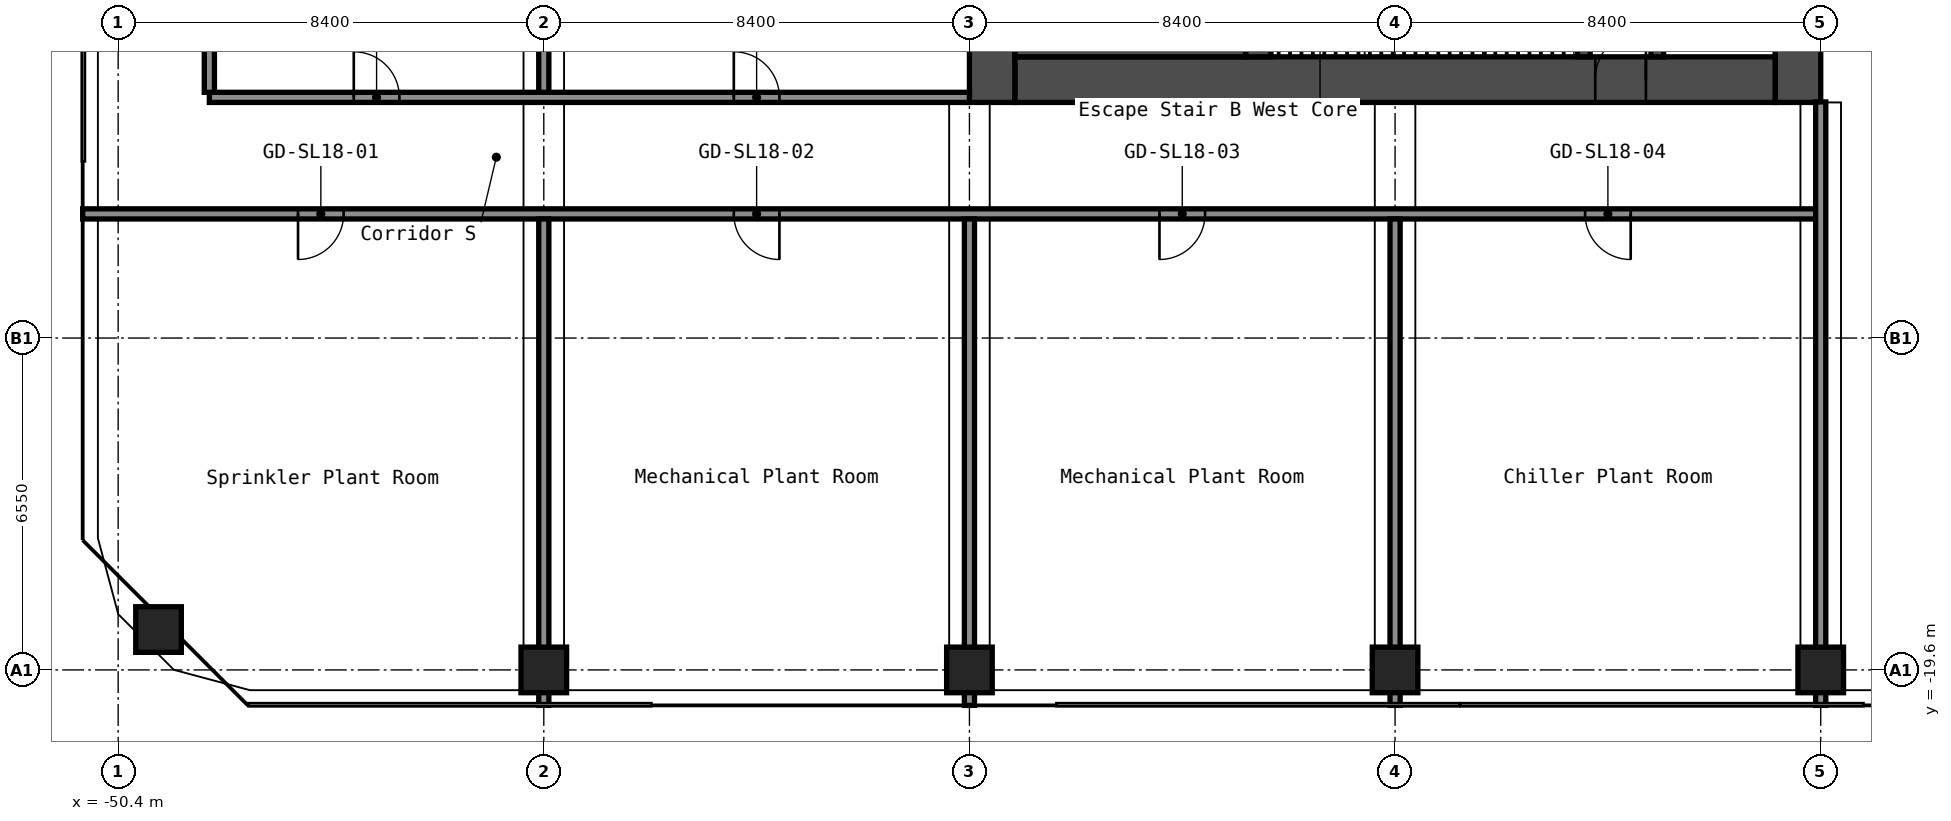
"""IFC4 building model, lengths in metres.
Left out: names, types, materials, properties, quantities, classifications, styles, units other than length and angle.
Written with IfcOpenShell. Run it as: python <this file> out.ifc"""

import sys

from ifc_helpers import new_model, si_unit, direction, frame, frame_2d, origin, origin_2d, place, context, subcontext, project, spatial, rectangle, hollow_rectangle, extrude, element, fill, save


model = new_model("IFC4")
c1 = context("Model", 3, precision=1e-05, world=origin(), true_north=direction((0.0, 1.0)))
c2 = subcontext(c1, "Body", "Model", "MODEL_VIEW")
j1 = project(units=[si_unit("LENGTHUNIT", "METRE"), si_unit("PLANEANGLEUNIT", "RADIAN")], contexts=[c1])
p1 = place(None, origin())
s1 = spatial("IfcSite", under=j1, at=p1, CompositionType="ELEMENT")
p2 = place(p1, origin())
s2 = spatial("IfcBuilding", under=s1, at=p2, CompositionType="ELEMENT")
p3 = place(p2, frame((0.0, 0.0, 64.6)))
s3 = spatial("IfcBuildingStorey", under=s2, at=p3, CompositionType="ELEMENT", Elevation=64.6)
for number, where, z_axis, x_axis in (
    (1, (-49.603, -18.803, 0.0), (0.0, 0.0, 1.0), (1.0, 0.0, 0.0)),
    (2, (-42.0, -19.6, 0.0), (0.0, 0.0, 1.0), (1.0, 0.0, 0.0)),
    (3, (-33.6, -19.6, 0.0), (0.0, 0.0, 1.0), (1.0, 0.0, 0.0)),
    (4, (-25.2, -19.6, 0.0), (0.0, 0.0, 1.0), (1.0, 0.0, 0.0)),
    (5, (-16.8, -19.6, 0.0), (0.0, 0.0, 1.0), (1.0, 0.0, 0.0)),
):
    element("IfcColumn", number, at=place(p3, frame(where, z_axis=z_axis, x_axis=x_axis)), inside=s3, PredefinedType="COLUMN", context=c2, shape_type="SweptSolid", body=[
        extrude(hollow_rectangle(XDim=0.9, YDim=0.9, WallThickness=0.036, at=origin_2d()), origin(), (0.0, 0.0, 1.0), 4.1),
    ])
p4 = place(p3, frame((-17.25, -8.4, 0.0), z_axis=(0.0, 0.0, 1.0), x_axis=(0.0, 1.0, 0.0)))
e6 = element("IfcWall", 6, at=p4, inside=s3, PredefinedType="SHEAR", context=c2, shape_type="SweptSolid", body=[
    extrude(rectangle(XDim=16.8, YDim=0.9, at=frame_2d((8.4, 0.0))), origin(), (0.0, 0.0, 1.0), 4.1),
])
p5 = place(p4, frame((7.6, 0.0, 0.0)))
e7 = element("IfcOpeningElement", 7, at=p5, cuts=e6, PredefinedType="OPENING", context=c2, shape_type="SweptSolid", body=[
    extrude(rectangle(XDim=1.2, YDim=2.1, at=frame_2d((0.6, 1.05))), frame((0.0, 0.46, 0.0), z_axis=(0.0, -1.0, 0.0), x_axis=(1.0, 0.0, 0.0)), (0.0, 0.0, 1.0), 0.92),
])
p6 = place(p3, frame((-33.15, -8.4, 0.0), z_axis=(0.0, 0.0, 1.0), x_axis=(0.0, 1.0, 0.0)))
e8 = element("IfcWall", 8, at=p6, inside=s3, PredefinedType="SHEAR", context=c2, shape_type="SweptSolid", body=[
    extrude(rectangle(XDim=16.8, YDim=0.9, at=frame_2d((8.4, 0.0))), origin(), (0.0, 0.0, 1.0), 4.1),
])
p7 = place(p3, frame((-32.7, -7.95, 0.0), z_axis=(0.0, 0.0, 1.0), x_axis=(1.0, 0.0, 0.0)))
e9 = element("IfcWall", 9, at=p7, inside=s3, PredefinedType="SHEAR", context=c2, shape_type="SweptSolid", body=[
    extrude(rectangle(XDim=15.0, YDim=0.9, at=frame_2d((7.5, 0.0))), origin(), (0.0, 0.0, 1.0), 4.1),
])
p8 = place(p7, frame((11.45, 0.0, 0.0)))
e10 = element("IfcOpeningElement", 10, at=p8, cuts=e9, PredefinedType="OPENING", context=c2, shape_type="SweptSolid", body=[
    extrude(rectangle(XDim=1.0, YDim=2.1, at=frame_2d((0.5, 1.05))), frame((0.0, 0.46, 0.0), z_axis=(0.0, -1.0, 0.0), x_axis=(1.0, 0.0, 0.0)), (0.0, 0.0, 1.0), 0.92),
])
p9 = place(p3, frame((-20.025, -7.5, 0.0), z_axis=(0.0, 0.0, 1.0), x_axis=(0.0, 1.0, 0.0)))
e11 = element("IfcWall", 11, at=p9, inside=s3, PredefinedType="SHEAR", context=c2, shape_type="SweptSolid", body=[
    extrude(rectangle(XDim=6.3, YDim=0.25, at=frame_2d((3.15, 0.0))), origin(), (0.0, 0.0, 1.0), 4.1),
])
p10 = place(p9, frame((2.4, 0.0, 0.0)))
e12 = element("IfcOpeningElement", 12, at=p10, cuts=e11, PredefinedType="OPENING", context=c2, shape_type="SweptSolid", body=[
    extrude(rectangle(XDim=1.0, YDim=2.1, at=frame_2d((0.5, 1.05))), frame((0.0, 0.135, 0.0), z_axis=(0.0, -1.0, 0.0), x_axis=(1.0, 0.0, 0.0)), (0.0, 0.0, 1.0), 0.27),
])
p11 = place(p3, frame((-21.475, -7.5, 0.0), z_axis=(0.0, 0.0, 1.0), x_axis=(0.0, 1.0, 0.0)))
e13 = element("IfcWall", 13, at=p11, inside=s3, PredefinedType="SHEAR", context=c2, shape_type="SweptSolid", body=[
    extrude(rectangle(XDim=3.75, YDim=0.25, at=frame_2d((1.875, 0.0))), origin(), (0.0, 0.0, 1.0), 4.1),
])
p12 = place(p11, frame((1.3, 0.0, 0.0)))
e14 = element("IfcOpeningElement", 14, at=p12, cuts=e13, PredefinedType="OPENING", context=c2, shape_type="SweptSolid", body=[
    extrude(rectangle(XDim=1.2, YDim=2.1, at=frame_2d((0.6, 1.05))), frame((0.0, 0.135, 0.0), z_axis=(0.0, -1.0, 0.0), x_axis=(1.0, 0.0, 0.0)), (0.0, 0.0, 1.0), 0.27),
])
p13 = place(p3, frame((-27.9, -7.5, 0.0), z_axis=(0.0, 0.0, 1.0), x_axis=(0.0, 1.0, 0.0)))
e15 = element("IfcWall", 15, at=p13, inside=s3, PredefinedType="SHEAR", context=c2, shape_type="SweptSolid", body=[
    extrude(rectangle(XDim=3.75, YDim=0.5, at=frame_2d((1.875, 0.0))), origin(), (0.0, 0.0, 1.0), 4.1),
])
p14 = place(p3, frame((-32.7, -6.75, 0.0), z_axis=(0.0, 0.0, 1.0), x_axis=(1.0, 0.0, 0.0)))
e16 = element("IfcWall", 16, at=p14, inside=s3, PredefinedType="SHEAR", context=c2, shape_type="SweptSolid", body=[
    extrude(rectangle(XDim=4.55, YDim=1.5, at=frame_2d((2.275, 0.0))), origin(), (0.0, 0.0, 1.0), 4.1),
])
p15 = place(p3, frame((-51.1, -10.6, 0.0), z_axis=(0.0, 0.0, 1.0), x_axis=(1.0, 0.0, 0.0)))
e17 = element("IfcWall", 17, at=p15, inside=s3, PredefinedType="PARTITIONING", context=c2, shape_type="SweptSolid", body=[
    extrude(rectangle(XDim=34.3, YDim=0.2, at=frame_2d((17.15, 0.0))), origin(), (0.0, 0.0, 1.0), 4.1),
])
p16 = place(p15, frame((4.25, 0.0, 0.0)))
e18 = element("IfcOpeningElement", 18, at=p16, cuts=e17, PredefinedType="OPENING", context=c2, shape_type="SweptSolid", body=[
    extrude(rectangle(XDim=0.9, YDim=2.1, at=frame_2d((0.45, 1.05))), frame((0.0, 0.11, 0.0), z_axis=(0.0, -1.0, 0.0), x_axis=(1.0, 0.0, 0.0)), (0.0, 0.0, 1.0), 0.22),
])
p17 = place(p15, frame((12.85, 0.0, 0.0)))
e19 = element("IfcOpeningElement", 19, at=p17, cuts=e17, PredefinedType="OPENING", context=c2, shape_type="SweptSolid", body=[
    extrude(rectangle(XDim=0.9, YDim=2.1, at=frame_2d((0.45, 1.05))), frame((0.0, 0.11, 0.0), z_axis=(0.0, -1.0, 0.0), x_axis=(1.0, 0.0, 0.0)), (0.0, 0.0, 1.0), 0.22),
])
p18 = place(p15, frame((21.25, 0.0, 0.0)))
e20 = element("IfcOpeningElement", 20, at=p18, cuts=e17, PredefinedType="OPENING", context=c2, shape_type="SweptSolid", body=[
    extrude(rectangle(XDim=0.9, YDim=2.1, at=frame_2d((0.45, 1.05))), frame((0.0, 0.11, 0.0), z_axis=(0.0, -1.0, 0.0), x_axis=(1.0, 0.0, 0.0)), (0.0, 0.0, 1.0), 0.22),
])
p19 = place(p15, frame((29.65, 0.0, 0.0)))
e21 = element("IfcOpeningElement", 21, at=p19, cuts=e17, PredefinedType="OPENING", context=c2, shape_type="SweptSolid", body=[
    extrude(rectangle(XDim=0.9, YDim=2.1, at=frame_2d((0.45, 1.05))), frame((0.0, 0.11, 0.0), z_axis=(0.0, -1.0, 0.0), x_axis=(1.0, 0.0, 0.0)), (0.0, 0.0, 1.0), 0.22),
])
p20 = place(p3, frame((-48.6, -8.3, 0.0), z_axis=(0.0, 0.0, 1.0), x_axis=(1.0, 0.0, 0.0)))
e22 = element("IfcWall", 22, at=p20, inside=s3, PredefinedType="PARTITIONING", context=c2, shape_type="SweptSolid", body=[
    extrude(rectangle(XDim=15.0, YDim=0.2, at=frame_2d((7.5, 0.0))), origin(), (0.0, 0.0, 1.0), 4.1),
])
p21 = place(p20, frame((2.85, 0.0, 0.0)))
e23 = element("IfcOpeningElement", 23, at=p21, cuts=e22, PredefinedType="OPENING", context=c2, shape_type="SweptSolid", body=[
    extrude(rectangle(XDim=0.9, YDim=2.1, at=frame_2d((0.45, 1.05))), frame((0.0, 0.11, 0.0), z_axis=(0.0, -1.0, 0.0), x_axis=(1.0, 0.0, 0.0)), (0.0, 0.0, 1.0), 0.22),
])
p22 = place(p20, frame((10.35, 0.0, 0.0)))
e24 = element("IfcOpeningElement", 24, at=p22, cuts=e22, PredefinedType="OPENING", context=c2, shape_type="SweptSolid", body=[
    extrude(rectangle(XDim=0.9, YDim=2.1, at=frame_2d((0.45, 1.05))), frame((0.0, 0.11, 0.0), z_axis=(0.0, -1.0, 0.0), x_axis=(1.0, 0.0, 0.0)), (0.0, 0.0, 1.0), 0.22),
])
p23 = place(p3, frame((-48.6, -8.2, 0.0), z_axis=(0.0, 0.0, 1.0), x_axis=(0.0, 1.0, 0.0)))
e25 = element("IfcWall", 25, at=p23, inside=s3, PredefinedType="PARTITIONING", context=c2, shape_type="SweptSolid", body=[
    extrude(rectangle(XDim=16.4, YDim=0.2, at=frame_2d((8.2, 0.0))), origin(), (0.0, 0.0, 1.0), 4.1),
])
p24 = place(p3, frame((-42.0, -20.3, 0.0), z_axis=(0.0, 0.0, 1.0), x_axis=(0.0, 1.0, 0.0)))
e26 = element("IfcWall", 26, at=p24, inside=s3, PredefinedType="PARTITIONING", context=c2, shape_type="SweptSolid", body=[
    extrude(rectangle(XDim=9.6, YDim=0.2, at=frame_2d((4.8, 0.0))), origin(), (0.0, 0.0, 1.0), 4.1),
])
p25 = place(p3, frame((-42.0, -8.2, 0.0), z_axis=(0.0, 0.0, 1.0), x_axis=(0.0, 1.0, 0.0)))
e27 = element("IfcWall", 27, at=p25, inside=s3, PredefinedType="PARTITIONING", context=c2, shape_type="SweptSolid", body=[
    extrude(rectangle(XDim=16.4, YDim=0.2, at=frame_2d((8.2, 0.0))), origin(), (0.0, 0.0, 1.0), 4.1),
])
for number, where, z_axis, x_axis in (
    (28, (-33.6, -20.3, 0.0), (0.0, 0.0, 1.0), (0.0, 1.0, 0.0)),
    (29, (-25.2, -20.3, 0.0), (0.0, 0.0, 1.0), (0.0, 1.0, 0.0)),
):
    element("IfcWall", number, at=place(p3, frame(where, z_axis=z_axis, x_axis=x_axis)), inside=s3, PredefinedType="PARTITIONING", context=c2, shape_type="SweptSolid", body=[
        extrude(rectangle(XDim=9.6, YDim=0.2, at=frame_2d((4.8, 0.0))), origin(), (0.0, 0.0, 1.0), 4.1),
    ])
p26 = place(p3, frame((-16.8, -20.3, 0.0), z_axis=(0.0, 0.0, 1.0), x_axis=(0.0, 1.0, 0.0)))
e30 = element("IfcWall", 30, at=p26, inside=s3, PredefinedType="PARTITIONING", context=c2, shape_type="SweptSolid", body=[
    extrude(rectangle(XDim=11.91, YDim=0.2, at=frame_2d((5.955, 0.0))), origin(), (0.0, 0.0, 1.0), 4.1),
])
p27 = place(p8, origin())
e31 = element("IfcDoor", 31, at=p27, inside=s3, OperationType="SINGLE_SWING_LEFT", PredefinedType="DOOR", context=c2, shape_type="SweptSolid", body=[
    extrude(rectangle(XDim=1.0, YDim=2.1, at=frame_2d((0.5, 1.05))), frame((0.0, 0.025, 0.0), z_axis=(0.0, -1.0, 0.0), x_axis=(1.0, 0.0, 0.0)), (0.0, 0.0, 1.0), 0.05),
])
fill(e10, e31)
p28 = place(p16, origin())
e32 = element("IfcDoor", 32, at=p28, inside=s3, OperationType="SINGLE_SWING_LEFT", PredefinedType="DOOR", context=c2, shape_type="SweptSolid", body=[
    extrude(rectangle(XDim=0.9, YDim=2.1, at=frame_2d((0.45, 1.05))), frame((0.0, 0.025, 0.0), z_axis=(0.0, -1.0, 0.0), x_axis=(1.0, 0.0, 0.0)), (0.0, 0.0, 1.0), 0.05),
])
fill(e18, e32)
p29 = place(p17, origin())
e33 = element("IfcDoor", 33, at=p29, inside=s3, OperationType="SINGLE_SWING_RIGHT", PredefinedType="DOOR", context=c2, shape_type="SweptSolid", body=[
    extrude(rectangle(XDim=0.9, YDim=2.1, at=frame_2d((0.45, 1.05))), frame((0.0, 0.025, 0.0), z_axis=(0.0, -1.0, 0.0), x_axis=(1.0, 0.0, 0.0)), (0.0, 0.0, 1.0), 0.05),
])
fill(e19, e33)
p30 = place(p18, origin())
e34 = element("IfcDoor", 34, at=p30, inside=s3, OperationType="SINGLE_SWING_LEFT", PredefinedType="DOOR", context=c2, shape_type="SweptSolid", body=[
    extrude(rectangle(XDim=0.9, YDim=2.1, at=frame_2d((0.45, 1.05))), frame((0.0, 0.025, 0.0), z_axis=(0.0, -1.0, 0.0), x_axis=(1.0, 0.0, 0.0)), (0.0, 0.0, 1.0), 0.05),
])
fill(e20, e34)
p31 = place(p19, origin())
e35 = element("IfcDoor", 35, at=p31, inside=s3, OperationType="SINGLE_SWING_RIGHT", PredefinedType="DOOR", context=c2, shape_type="SweptSolid", body=[
    extrude(rectangle(XDim=0.9, YDim=2.1, at=frame_2d((0.45, 1.05))), frame((0.0, 0.025, 0.0), z_axis=(0.0, -1.0, 0.0), x_axis=(1.0, 0.0, 0.0)), (0.0, 0.0, 1.0), 0.05),
])
fill(e21, e35)
p32 = place(p21, origin())
e36 = element("IfcDoor", 36, at=p32, inside=s3, OperationType="SINGLE_SWING_RIGHT", PredefinedType="DOOR", context=c2, shape_type="SweptSolid", body=[
    extrude(rectangle(XDim=0.9, YDim=2.1, at=frame_2d((0.45, 1.05))), frame((0.0, 0.025, 0.0), z_axis=(0.0, -1.0, 0.0), x_axis=(1.0, 0.0, 0.0)), (0.0, 0.0, 1.0), 0.05),
])
fill(e23, e36)
p33 = place(p22, origin())
e37 = element("IfcDoor", 37, at=p33, inside=s3, OperationType="SINGLE_SWING_RIGHT", PredefinedType="DOOR", context=c2, shape_type="SweptSolid", body=[
    extrude(rectangle(XDim=0.9, YDim=2.1, at=frame_2d((0.45, 1.05))), frame((0.0, 0.025, 0.0), z_axis=(0.0, -1.0, 0.0), x_axis=(1.0, 0.0, 0.0)), (0.0, 0.0, 1.0), 0.05),
])
fill(e24, e37)
save(model, sys.argv[1])
